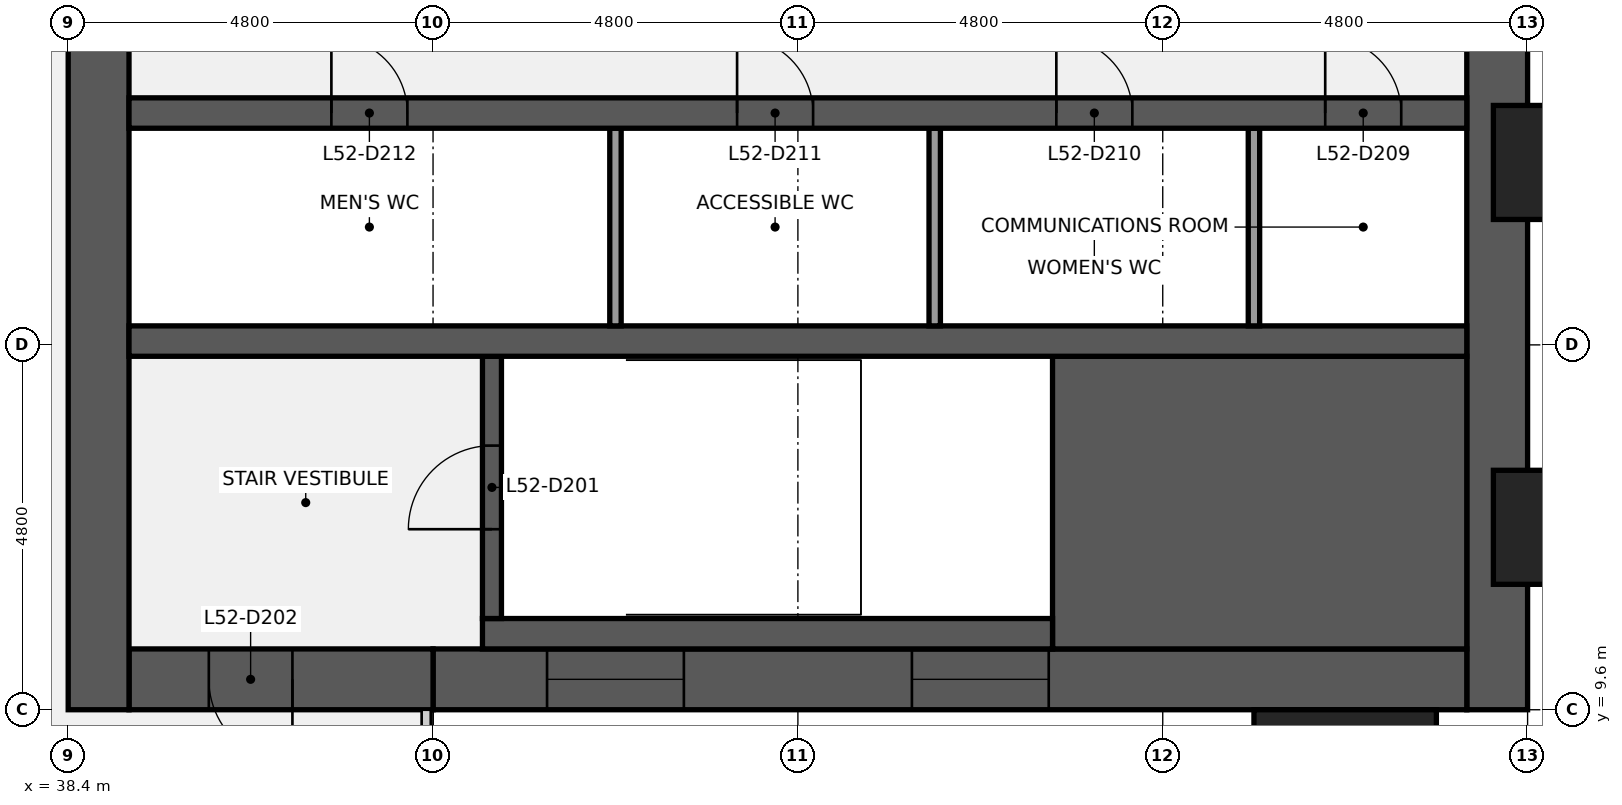
"""IFC4 building model, lengths in metres.
Left out: names, types, materials, properties, quantities, classifications, styles, units other than length and angle.
Written with IfcOpenShell. Run it as: python <this file> out.ifc"""

import sys

from ifc_helpers import new_model, si_unit, direction, frame, frame_2d, origin, origin_2d, place, context, subcontext, project, spatial, rectangle, extrude, element, fill, save


model = new_model("IFC4")
c1 = context("Model", 3, precision=1e-05, world=origin(), true_north=direction((0.0, 1.0)))
c2 = subcontext(c1, "Body", "Model", "MODEL_VIEW")
j1 = project(units=[si_unit("LENGTHUNIT", "METRE"), si_unit("PLANEANGLEUNIT", "RADIAN")], contexts=[c1])
p1 = place(None, origin())
s1 = spatial("IfcSite", under=j1, at=p1, CompositionType="ELEMENT")
p2 = place(p1, origin())
s2 = spatial("IfcBuilding", under=s1, at=p2, CompositionType="ELEMENT")
p3 = place(p2, frame((0.0, 0.0, 237.2)))
s3 = spatial("IfcBuildingStorey", under=s2, at=p3, CompositionType="ELEMENT", Elevation=237.2)
p4 = place(p3, frame((57.2, 38.4, 0.0), z_axis=(0.0, 0.0, 1.0), x_axis=(0.0, -1.0, 0.0)))
e1 = element("IfcWall", 1, at=p4, inside=s3, PredefinedType="SHEAR", context=c2, shape_type="SweptSolid", body=[
    extrude(rectangle(XDim=28.8, YDim=0.8, at=frame_2d((14.4, 0.0))), origin(), (0.0, 0.0, 1.0), 3.84),
])
p5 = place(p4, frame((18.45, 0.0, 0.9)))
e2 = element("IfcOpeningElement", 2, at=p5, cuts=e1, PredefinedType="OPENING", context=c2, shape_type="SweptSolid", body=[
    extrude(rectangle(XDim=1.5, YDim=1.5, at=frame_2d((0.75, 0.75))), frame((0.0, 0.41, 0.0), z_axis=(0.0, -1.0, 0.0), x_axis=(1.0, 0.0, 0.0)), (0.0, 0.0, 1.0), 0.82),
])
p6 = place(p4, frame((8.85, 0.0, 0.9)))
e3 = element("IfcOpeningElement", 3, at=p6, cuts=e1, PredefinedType="OPENING", context=c2, shape_type="SweptSolid", body=[
    extrude(rectangle(XDim=1.5, YDim=1.5, at=frame_2d((0.75, 0.75))), frame((0.0, 0.41, 0.0), z_axis=(0.0, -1.0, 0.0), x_axis=(1.0, 0.0, 0.0)), (0.0, 0.0, 1.0), 0.82),
])
p7 = place(p3, frame((56.8, 10.0, 0.0), z_axis=(0.0, 0.0, 1.0), x_axis=(-1.0, 0.0, 0.0)))
e4 = element("IfcWall", 4, at=p7, inside=s3, PredefinedType="SHEAR", context=c2, shape_type="SweptSolid", body=[
    extrude(rectangle(XDim=13.6, YDim=0.8, at=frame_2d((6.8, 0.0))), origin(), (0.0, 0.0, 1.0), 3.84),
])
p8 = place(p7, frame((5.5, 0.0, 0.9)))
e5 = element("IfcOpeningElement", 5, at=p8, cuts=e4, PredefinedType="OPENING", context=c2, shape_type="SweptSolid", body=[
    extrude(rectangle(XDim=1.8, YDim=1.5, at=frame_2d((0.9, 0.75))), frame((0.0, 0.41, 0.0), z_axis=(0.0, -1.0, 0.0), x_axis=(1.0, 0.0, 0.0)), (0.0, 0.0, 1.0), 0.82),
])
p9 = place(p7, frame((10.3, 0.0, 0.9)))
e6 = element("IfcOpeningElement", 6, at=p9, cuts=e4, PredefinedType="OPENING", context=c2, shape_type="SweptSolid", body=[
    extrude(rectangle(XDim=1.8, YDim=1.5, at=frame_2d((0.9, 0.75))), frame((0.0, 0.41, 0.0), z_axis=(0.0, -1.0, 0.0), x_axis=(1.0, 0.0, 0.0)), (0.0, 0.0, 1.0), 0.82),
])
p10 = place(p3, frame((43.2, 10.0, 0.0), z_axis=(0.0, 0.0, 1.0), x_axis=(-1.0, 0.0, 0.0)))
e7 = element("IfcWall", 7, at=p10, inside=s3, PredefinedType="SHEAR", context=c2, shape_type="SweptSolid", body=[
    extrude(rectangle(XDim=4.0, YDim=0.8, at=frame_2d((2.0, 0.0))), origin(), (0.0, 0.0, 1.0), 3.84),
])
p11 = place(p10, frame((1.85, 0.0, 0.0)))
e8 = element("IfcOpeningElement", 8, at=p11, cuts=e7, PredefinedType="OPENING", context=c2, shape_type="SweptSolid", body=[
    extrude(rectangle(XDim=1.1, YDim=2.1, at=frame_2d((0.55, 1.05))), frame((0.0, 0.41, 0.0), z_axis=(0.0, -1.0, 0.0), x_axis=(1.0, 0.0, 0.0)), (0.0, 0.0, 1.0), 0.82),
])
p12 = place(p3, frame((38.8, 9.6, 0.0), z_axis=(0.0, 0.0, 1.0), x_axis=(0.0, 1.0, 0.0)))
e9 = element("IfcWall", 9, at=p12, inside=s3, PredefinedType="SHEAR", context=c2, shape_type="SweptSolid", body=[
    extrude(rectangle(XDim=28.8, YDim=0.8, at=frame_2d((14.4, 0.0))), origin(), (0.0, 0.0, 1.0), 3.84),
])
p13 = place(p12, frame((8.7, 0.0, 0.0)))
e10 = element("IfcOpeningElement", 10, at=p13, cuts=e9, PredefinedType="OPENING", context=c2, shape_type="SweptSolid", body=[
    extrude(rectangle(XDim=1.8, YDim=2.1, at=frame_2d((0.9, 1.05))), frame((0.0, 0.41, 0.0), z_axis=(0.0, -1.0, 0.0), x_axis=(1.0, 0.0, 0.0)), (0.0, 0.0, 1.0), 0.82),
])
p14 = place(p12, frame((18.3, 0.0, 0.0)))
e11 = element("IfcOpeningElement", 11, at=p14, cuts=e9, PredefinedType="OPENING", context=c2, shape_type="SweptSolid", body=[
    extrude(rectangle(XDim=1.8, YDim=2.1, at=frame_2d((0.9, 1.05))), frame((0.0, 0.41, 0.0), z_axis=(0.0, -1.0, 0.0), x_axis=(1.0, 0.0, 0.0)), (0.0, 0.0, 1.0), 0.82),
])
p15 = place(p3, frame((51.35, 12.325, 0.0), z_axis=(0.0, 0.0, 1.0), x_axis=(1.0, 0.0, 0.0)))
e12 = element("IfcWall", 12, at=p15, inside=s3, PredefinedType="SHEAR", context=c2, shape_type="SweptSolid", body=[
    extrude(rectangle(XDim=5.45, YDim=3.85, at=frame_2d((2.725, 0.0))), origin(), (0.0, 0.0, 1.0), 3.84),
])
p16 = place(p3, frame((43.85, 10.6, 0.0), z_axis=(0.0, 0.0, 1.0), x_axis=(1.0, 0.0, 0.0)))
e13 = element("IfcWall", 13, at=p16, inside=s3, PredefinedType="SHEAR", context=c2, shape_type="SweptSolid", body=[
    extrude(rectangle(XDim=7.5, YDim=0.4, at=frame_2d((3.75, 0.0))), origin(), (0.0, 0.0, 1.0), 3.84),
])
p17 = place(p3, frame((43.975, 10.8, 0.0), z_axis=(0.0, 0.0, 1.0), x_axis=(0.0, 1.0, 0.0)))
e14 = element("IfcWall", 14, at=p17, inside=s3, PredefinedType="SHEAR", context=c2, shape_type="SweptSolid", body=[
    extrude(rectangle(XDim=3.45, YDim=0.25, at=frame_2d((1.725, 0.0))), origin(), (0.0, 0.0, 1.0), 3.84),
])
p18 = place(p17, frame((1.175, 0.0, 0.0)))
e15 = element("IfcOpeningElement", 15, at=p18, cuts=e14, PredefinedType="OPENING", context=c2, shape_type="SweptSolid", body=[
    extrude(rectangle(XDim=1.1, YDim=2.1, at=frame_2d((0.55, 1.05))), frame((0.0, 0.135, 0.0), z_axis=(0.0, -1.0, 0.0), x_axis=(1.0, 0.0, 0.0)), (0.0, 0.0, 1.0), 0.27),
])
p19 = place(p3, frame((39.2, 14.45, 0.0), z_axis=(0.0, 0.0, 1.0), x_axis=(1.0, 0.0, 0.0)))
e16 = element("IfcWall", 16, at=p19, inside=s3, PredefinedType="SHEAR", context=c2, shape_type="SweptSolid", body=[
    extrude(rectangle(XDim=17.6, YDim=0.4, at=frame_2d((8.8, 0.0))), origin(), (0.0, 0.0, 1.0), 3.84),
])
for number, where, z_axis, x_axis in (
    (17, (54.0, 14.65, 0.0), (0.0, 0.0, 1.0), (0.0, 1.0, 0.0)),
    (18, (49.8, 14.65, 0.0), (0.0, 0.0, 1.0), (0.0, 1.0, 0.0)),
    (19, (45.6, 14.65, 0.0), (0.0, 0.0, 1.0), (0.0, 1.0, 0.0)),
):
    element("IfcWall", number, at=place(p3, frame(where, z_axis=z_axis, x_axis=x_axis)), inside=s3, PredefinedType="PARTITIONING", context=c2, shape_type="SweptSolid", body=[
        extrude(rectangle(XDim=2.6, YDim=0.15, at=frame_2d((1.3, 0.0))), origin(), (0.0, 0.0, 1.0), 3.84),
    ])
p20 = place(p3, frame((39.2, 17.45, 0.0), z_axis=(0.0, 0.0, 1.0), x_axis=(1.0, 0.0, 0.0)))
e20 = element("IfcWall", 20, at=p20, inside=s3, PredefinedType="SHEAR", context=c2, shape_type="SweptSolid", body=[
    extrude(rectangle(XDim=17.6, YDim=0.4, at=frame_2d((8.8, 0.0))), origin(), (0.0, 0.0, 1.0), 3.84),
])
p21 = place(p20, frame((15.738, 0.0, 0.0)))
e21 = element("IfcOpeningElement", 21, at=p21, cuts=e20, PredefinedType="OPENING", context=c2, shape_type="SweptSolid", body=[
    extrude(rectangle(XDim=1.0, YDim=2.1, at=frame_2d((0.5, 1.05))), frame((0.0, 0.21, 0.0), z_axis=(0.0, -1.0, 0.0), x_axis=(1.0, 0.0, 0.0)), (0.0, 0.0, 1.0), 0.42),
])
p22 = place(p20, frame((12.2, 0.0, 0.0)))
e22 = element("IfcOpeningElement", 22, at=p22, cuts=e20, PredefinedType="OPENING", context=c2, shape_type="SweptSolid", body=[
    extrude(rectangle(XDim=1.0, YDim=2.1, at=frame_2d((0.5, 1.05))), frame((0.0, 0.21, 0.0), z_axis=(0.0, -1.0, 0.0), x_axis=(1.0, 0.0, 0.0)), (0.0, 0.0, 1.0), 0.42),
])
p23 = place(p20, frame((8.0, 0.0, 0.0)))
e23 = element("IfcOpeningElement", 23, at=p23, cuts=e20, PredefinedType="OPENING", context=c2, shape_type="SweptSolid", body=[
    extrude(rectangle(XDim=1.0, YDim=2.1, at=frame_2d((0.5, 1.05))), frame((0.0, 0.21, 0.0), z_axis=(0.0, -1.0, 0.0), x_axis=(1.0, 0.0, 0.0)), (0.0, 0.0, 1.0), 0.42),
])
p24 = place(p20, frame((2.663, 0.0, 0.0)))
e24 = element("IfcOpeningElement", 24, at=p24, cuts=e20, PredefinedType="OPENING", context=c2, shape_type="SweptSolid", body=[
    extrude(rectangle(XDim=1.0, YDim=2.1, at=frame_2d((0.5, 1.05))), frame((0.0, 0.21, 0.0), z_axis=(0.0, -1.0, 0.0), x_axis=(1.0, 0.0, 0.0)), (0.0, 0.0, 1.0), 0.42),
])
for number, where, z_axis, x_axis in (
    (25, (55.2, 8.85, 0.0), (0.0, 0.0, 1.0), (1.0, 0.0, 0.0)),
    (26, (58.35, 12.0, 0.0), (0.0, 0.0, 1.0), (0.0, 1.0, 0.0)),
    (27, (58.35, 16.8, 0.0), (0.0, 0.0, 1.0), (0.0, 1.0, 0.0)),
):
    element("IfcColumn", number, at=place(p3, frame(where, z_axis=z_axis, x_axis=x_axis)), inside=s3, PredefinedType="PILASTER", context=c2, shape_type="SweptSolid", body=[
        extrude(rectangle(XDim=2.4, YDim=1.5, at=origin_2d()), origin(), (0.0, 0.0, 1.0), 4.0),
    ])
p25 = place(p18, origin())
e28 = element("IfcDoor", 28, at=p25, inside=s3, OperationType="SINGLE_SWING_LEFT", PredefinedType="DOOR", context=c2, shape_type="SweptSolid", body=[
    extrude(rectangle(XDim=1.1, YDim=2.1, at=frame_2d((0.55, 1.05))), frame((0.0, 0.025, 0.0), z_axis=(0.0, -1.0, 0.0), x_axis=(1.0, 0.0, 0.0)), (0.0, 0.0, 1.0), 0.05),
])
fill(e15, e28)
p26 = place(p11, origin())
e29 = element("IfcDoor", 29, at=p26, inside=s3, OperationType="SINGLE_SWING_LEFT", PredefinedType="DOOR", context=c2, shape_type="SweptSolid", body=[
    extrude(rectangle(XDim=1.1, YDim=2.1, at=frame_2d((0.55, 1.05))), frame((0.0, 0.025, 0.0), z_axis=(0.0, -1.0, 0.0), x_axis=(1.0, 0.0, 0.0)), (0.0, 0.0, 1.0), 0.05),
])
fill(e8, e29)
p27 = place(p21, origin())
e30 = element("IfcDoor", 30, at=p27, inside=s3, OperationType="SINGLE_SWING_LEFT", PredefinedType="DOOR", context=c2, shape_type="SweptSolid", body=[
    extrude(rectangle(XDim=1.0, YDim=2.1, at=frame_2d((0.5, 1.05))), frame((0.0, 0.025, 0.0), z_axis=(0.0, -1.0, 0.0), x_axis=(1.0, 0.0, 0.0)), (0.0, 0.0, 1.0), 0.05),
])
fill(e21, e30)
p28 = place(p22, origin())
e31 = element("IfcDoor", 31, at=p28, inside=s3, OperationType="SINGLE_SWING_LEFT", PredefinedType="DOOR", context=c2, shape_type="SweptSolid", body=[
    extrude(rectangle(XDim=1.0, YDim=2.1, at=frame_2d((0.5, 1.05))), frame((0.0, 0.025, 0.0), z_axis=(0.0, -1.0, 0.0), x_axis=(1.0, 0.0, 0.0)), (0.0, 0.0, 1.0), 0.05),
])
fill(e22, e31)
p29 = place(p23, origin())
e32 = element("IfcDoor", 32, at=p29, inside=s3, OperationType="SINGLE_SWING_LEFT", PredefinedType="DOOR", context=c2, shape_type="SweptSolid", body=[
    extrude(rectangle(XDim=1.0, YDim=2.1, at=frame_2d((0.5, 1.05))), frame((0.0, 0.025, 0.0), z_axis=(0.0, -1.0, 0.0), x_axis=(1.0, 0.0, 0.0)), (0.0, 0.0, 1.0), 0.05),
])
fill(e23, e32)
p30 = place(p24, origin())
e33 = element("IfcDoor", 33, at=p30, inside=s3, OperationType="SINGLE_SWING_LEFT", PredefinedType="DOOR", context=c2, shape_type="SweptSolid", body=[
    extrude(rectangle(XDim=1.0, YDim=2.1, at=frame_2d((0.5, 1.05))), frame((0.0, 0.025, 0.0), z_axis=(0.0, -1.0, 0.0), x_axis=(1.0, 0.0, 0.0)), (0.0, 0.0, 1.0), 0.05),
])
fill(e24, e33)
p31 = place(p8, origin())
e34 = element("IfcWindow", 34, at=p31, inside=s3, PartitioningType="SINGLE_PANEL", PredefinedType="WINDOW", context=c2, shape_type="SweptSolid", body=[
    extrude(rectangle(XDim=1.8, YDim=1.5, at=frame_2d((0.9, 0.75))), frame((0.0, 0.03, 0.0), z_axis=(0.0, -1.0, 0.0), x_axis=(1.0, 0.0, 0.0)), (0.0, 0.0, 1.0), 0.06),
])
fill(e5, e34)
p32 = place(p9, origin())
e35 = element("IfcWindow", 35, at=p32, inside=s3, PartitioningType="SINGLE_PANEL", PredefinedType="WINDOW", context=c2, shape_type="SweptSolid", body=[
    extrude(rectangle(XDim=1.8, YDim=1.5, at=frame_2d((0.9, 0.75))), frame((0.0, 0.03, 0.0), z_axis=(0.0, -1.0, 0.0), x_axis=(1.0, 0.0, 0.0)), (0.0, 0.0, 1.0), 0.06),
])
fill(e6, e35)
save(model, sys.argv[1])
